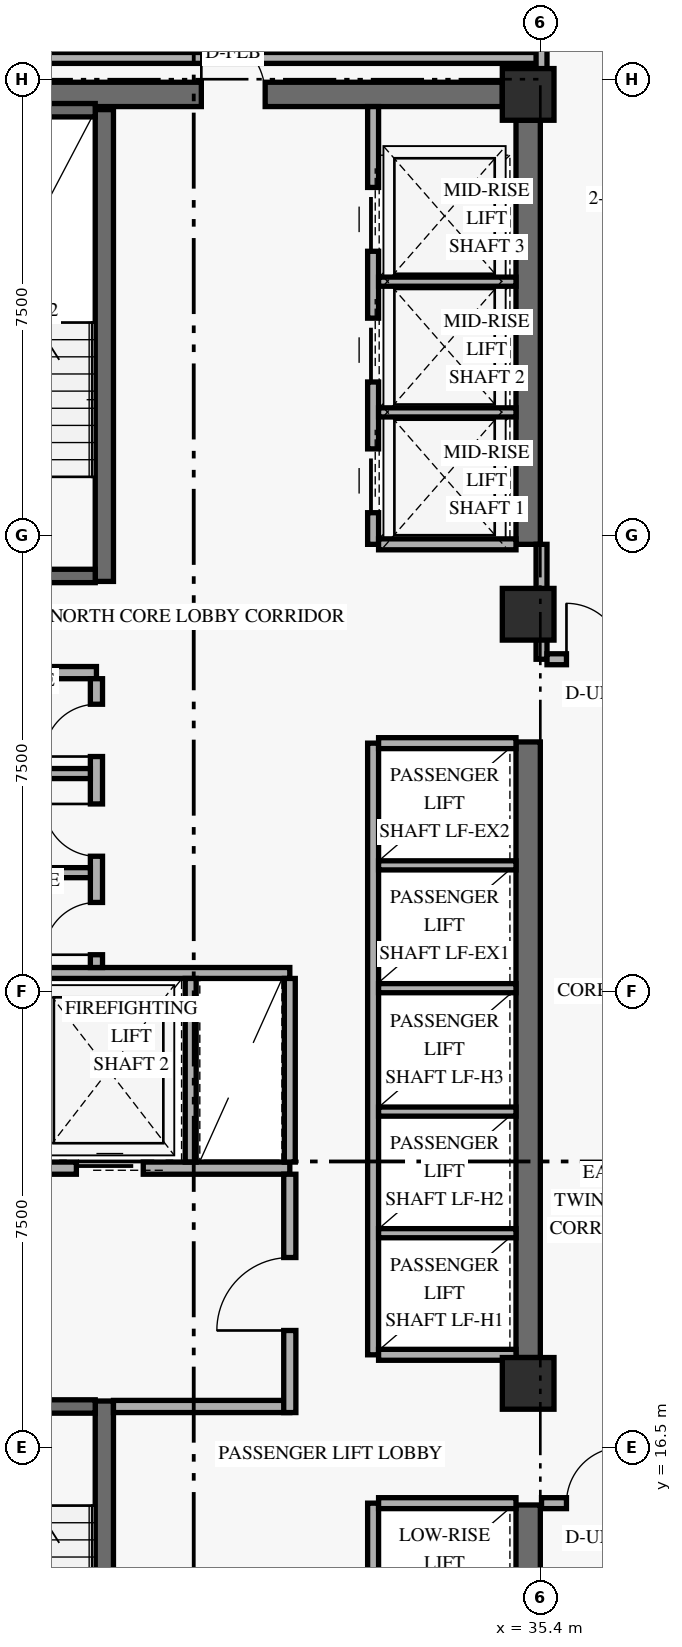
"""IFC4 building model, lengths in metres.
Left out: names, types, materials, properties, quantities, classifications, styles, units other than length and angle.
Written with IfcOpenShell. Run it as: python <this file> out.ifc"""

import sys

from ifc_helpers import new_model, si_unit, direction, frame, frame_2d, origin, origin_2d, place, context, subcontext, project, spatial, rectangle, extrude, element, fill, save


model = new_model("IFC4")
c1 = context("Model", 3, precision=1e-05, world=origin(), true_north=direction((0.0, 1.0)))
c2 = subcontext(c1, "Body", "Model", "MODEL_VIEW")
j1 = project(units=[si_unit("LENGTHUNIT", "METRE"), si_unit("PLANEANGLEUNIT", "RADIAN")], contexts=[c1])
p1 = place(None, origin())
s1 = spatial("IfcSite", under=j1, at=p1, CompositionType="ELEMENT")
p2 = place(p1, origin())
s2 = spatial("IfcBuilding", under=s1, at=p2, CompositionType="ELEMENT")
p3 = place(p2, frame((0.0, 0.0, 102.6)))
s3 = spatial("IfcBuildingStorey", under=s2, at=p3, CompositionType="ELEMENT", Elevation=102.6)
p4 = place(p3, frame((35.2, 9.675, 0.0), z_axis=(0.0, 0.0, 1.0), x_axis=(0.0, 1.0, 0.0)))
e1 = element("IfcWall", 1, at=p4, inside=s3, PredefinedType="SHEAR", context=c2, shape_type="SweptSolid", body=[
    extrude(rectangle(XDim=5.875, YDim=0.4, at=frame_2d((2.938, 0.0))), origin(), (0.0, 0.0, 1.0), 2.749),
])
p5 = place(p3, frame((35.2, 17.975, 0.0), z_axis=(0.0, 0.0, 1.0), x_axis=(0.0, 1.0, 0.0)))
e2 = element("IfcWall", 2, at=p5, inside=s3, PredefinedType="SHEAR", context=c2, shape_type="SweptSolid", body=[
    extrude(rectangle(XDim=10.125, YDim=0.4, at=frame_2d((5.062, 0.0))), origin(), (0.0, 0.0, 1.0), 2.749),
])
p6 = place(p3, frame((35.2, 31.35, 0.0), z_axis=(0.0, 0.0, 1.0), x_axis=(0.0, 1.0, 0.0)))
e3 = element("IfcWall", 3, at=p6, inside=s3, PredefinedType="SHEAR", context=c2, shape_type="SweptSolid", body=[
    extrude(rectangle(XDim=6.975, YDim=0.4, at=frame_2d((3.487, 0.0))), origin(), (0.0, 0.0, 1.0), 2.749),
])
p7 = place(p3, frame((24.625, 38.75, 0.0), z_axis=(0.0, 0.0, 1.0), x_axis=(1.0, 0.0, 0.0)))
e4 = element("IfcWall", 4, at=p7, inside=s3, PredefinedType="SHEAR", context=c2, shape_type="SweptSolid", body=[
    extrude(rectangle(XDim=10.15, YDim=0.4, at=frame_2d((5.075, 0.0))), origin(), (0.0, 0.0, 1.0), 3.36),
])
p8 = place(p7, frame((5.2, 0.0, 0.0)))
e5 = element("IfcOpeningElement", 5, at=p8, cuts=e4, PredefinedType="OPENING", context=c2, shape_type="SweptSolid", body=[
    extrude(rectangle(XDim=1.05, YDim=2.15, at=frame_2d((0.525, 1.075))), frame((0.0, 0.21, 0.0), z_axis=(0.0, -1.0, 0.0), x_axis=(1.0, 0.0, 0.0)), (0.0, 0.0, 1.0), 0.42),
])
p9 = place(p3, frame((28.23, 9.5, 0.0), z_axis=(0.0, 0.0, 1.0), x_axis=(0.0, 1.0, 0.0)))
e6 = element("IfcWall", 6, at=p9, inside=s3, PredefinedType="SHEAR", context=c2, shape_type="SweptSolid", body=[
    extrude(rectangle(XDim=7.76, YDim=0.3, at=frame_2d((3.88, 0.0))), origin(), (0.0, 0.0, 1.0), 3.36),
])
p10 = place(p3, frame((24.92, 17.17, 0.0), z_axis=(0.0, 0.0, 1.0), x_axis=(1.0, 0.0, 0.0)))
e7 = element("IfcWall", 7, at=p10, inside=s3, PredefinedType="SHEAR", context=c2, shape_type="SweptSolid", body=[
    extrude(rectangle(XDim=3.16, YDim=0.22, at=frame_2d((1.58, 0.0))), origin(), (0.0, 0.0, 1.0), 3.36),
])
p11 = place(p10, frame((0.78, 0.0, 0.0)))
e8 = element("IfcOpeningElement", 8, at=p11, cuts=e7, PredefinedType="OPENING", context=c2, shape_type="SweptSolid", body=[
    extrude(rectangle(XDim=1.05, YDim=2.15, at=frame_2d((0.525, 1.075))), frame((0.0, 0.12, 0.0), z_axis=(0.0, -1.0, 0.0), x_axis=(1.0, 0.0, 0.0)), (0.0, 0.0, 1.0), 0.24),
])
p12 = place(p3, frame((28.23, 30.74, 0.0), z_axis=(0.0, 0.0, 1.0), x_axis=(0.0, 1.0, 0.0)))
e9 = element("IfcWall", 9, at=p12, inside=s3, PredefinedType="SHEAR", context=c2, shape_type="SweptSolid", body=[
    extrude(rectangle(XDim=7.76, YDim=0.3, at=frame_2d((3.88, 0.0))), origin(), (0.0, 0.0, 1.0), 3.36),
])
p13 = place(p3, frame((24.92, 30.83, 0.0), z_axis=(0.0, 0.0, 1.0), x_axis=(1.0, 0.0, 0.0)))
e10 = element("IfcWall", 10, at=p13, inside=s3, PredefinedType="SHEAR", context=c2, shape_type="SweptSolid", body=[
    extrude(rectangle(XDim=3.16, YDim=0.22, at=frame_2d((1.58, 0.0))), origin(), (0.0, 0.0, 1.0), 3.36),
])
p14 = place(p13, frame((0.78, 0.0, 0.0)))
e11 = element("IfcOpeningElement", 11, at=p14, cuts=e10, PredefinedType="OPENING", context=c2, shape_type="SweptSolid", body=[
    extrude(rectangle(XDim=1.05, YDim=2.15, at=frame_2d((0.525, 1.075))), frame((0.0, 0.12, 0.0), z_axis=(0.0, -1.0, 0.0), x_axis=(1.0, 0.0, 0.0)), (0.0, 0.0, 1.0), 0.24),
])
p15 = place(p3, frame((24.92, 38.49, 0.0), z_axis=(0.0, 0.0, 1.0), x_axis=(1.0, 0.0, 0.0)))
e12 = element("IfcWall", 12, at=p15, inside=s3, PredefinedType="SHEAR", context=c2, shape_type="SweptSolid", body=[
    extrude(rectangle(XDim=3.16, YDim=0.22, at=frame_2d((1.58, 0.0))), origin(), (0.0, 0.0, 1.0), 3.36),
])
for number, where, z_axis, x_axis in (
    (13, (35.2, 17.55, 0.0), (0.0, 0.0, 1.0), (1.0, 0.0, 0.0)),
    (14, (35.2, 30.2, 0.0), (0.0, 0.0, 1.0), (1.0, 0.0, 0.0)),
    (15, (35.2, 38.75, 0.0), (0.0, 0.0, 1.0), (1.0, 0.0, 0.0)),
):
    element("IfcColumn", number, at=place(p3, frame(where, z_axis=z_axis, x_axis=x_axis)), inside=s3, PredefinedType="COLUMN", context=c2, shape_type="SweptSolid", body=[
        extrude(rectangle(XDim=0.85, YDim=0.85, at=origin_2d()), origin(), (0.0, 0.0, 1.0), 3.6),
    ])
p16 = place(p3, frame((24.45, 21.09, 0.0), z_axis=(0.0, 0.0, 1.0), x_axis=(1.0, 0.0, 0.0)))
e16 = element("IfcWall", 16, at=p16, inside=s3, PredefinedType="STANDARD", context=c2, shape_type="SweptSolid", body=[
    extrude(rectangle(XDim=6.83, YDim=0.2, at=frame_2d((3.415, 0.0))), origin(), (0.0, 0.0, 1.0), 3.36),
])
p17 = place(p16, frame((0.72, 0.0, 0.0)))
e17 = element("IfcOpeningElement", 17, at=p17, cuts=e16, PredefinedType="OPENING", context=c2, shape_type="SweptSolid", body=[
    extrude(rectangle(XDim=1.1, YDim=2.2, at=frame_2d((0.55, 1.1))), frame((0.0, 0.11, 0.0), z_axis=(0.0, -1.0, 0.0), x_axis=(1.0, 0.0, 0.0)), (0.0, 0.0, 1.0), 0.22),
])
p18 = place(p16, frame((3.32, 0.0, 0.0)))
e18 = element("IfcOpeningElement", 18, at=p18, cuts=e16, PredefinedType="OPENING", context=c2, shape_type="SweptSolid", body=[
    extrude(rectangle(XDim=1.1, YDim=2.2, at=frame_2d((0.55, 1.1))), frame((0.0, 0.11, 0.0), z_axis=(0.0, -1.0, 0.0), x_axis=(1.0, 0.0, 0.0)), (0.0, 0.0, 1.0), 0.22),
])
p19 = place(p3, frame((28.38, 17.17, 0.0), z_axis=(0.0, 0.0, 1.0), x_axis=(1.0, 0.0, 0.0)))
e19 = element("IfcWall", 19, at=p19, inside=s3, PredefinedType="STANDARD", context=c2, shape_type="SweptSolid", body=[
    extrude(rectangle(XDim=2.9, YDim=0.2, at=frame_2d((1.45, 0.0))), origin(), (0.0, 0.0, 1.0), 3.36),
])
p20 = place(p3, frame((31.28, 17.07, 0.0), z_axis=(0.0, 0.0, 1.0), x_axis=(0.0, 1.0, 0.0)))
e20 = element("IfcWall", 20, at=p20, inside=s3, PredefinedType="STANDARD", context=c2, shape_type="SweptSolid", body=[
    extrude(rectangle(XDim=3.92, YDim=0.2, at=frame_2d((1.96, 0.0))), origin(), (0.0, 0.0, 1.0), 2.731),
])
p21 = place(p20, frame((1.35, 0.0, 0.0)))
e21 = element("IfcOpeningElement", 21, at=p21, cuts=e20, PredefinedType="OPENING", context=c2, shape_type="SweptSolid", body=[
    extrude(rectangle(XDim=1.2, YDim=2.15, at=frame_2d((0.6, 1.075))), frame((0.0, 0.11, 0.0), z_axis=(0.0, -1.0, 0.0), x_axis=(1.0, 0.0, 0.0)), (0.0, 0.0, 1.0), 0.22),
])
p22 = place(p3, frame((24.45, 24.3, 0.0), z_axis=(0.0, 0.0, 1.0), x_axis=(1.0, 0.0, 0.0)))
e22 = element("IfcWall", 22, at=p22, inside=s3, PredefinedType="STANDARD", context=c2, shape_type="SweptSolid", body=[
    extrude(rectangle(XDim=6.83, YDim=0.18, at=frame_2d((3.415, 0.0))), origin(), (0.0, 0.0, 1.0), 3.36),
])
for number, where, z_axis, x_axis in (
    (23, (29.65, 21.19, 0.0), (0.0, 0.0, 1.0), (0.0, 1.0, 0.0)),
    (24, (31.28, 21.19, 0.0), (0.0, 0.0, 1.0), (0.0, 1.0, 0.0)),
):
    element("IfcWall", number, at=place(p3, frame(where, z_axis=z_axis, x_axis=x_axis)), inside=s3, PredefinedType="STANDARD", context=c2, shape_type="SweptSolid", body=[
        extrude(rectangle(XDim=3.02, YDim=0.18, at=frame_2d((1.51, 0.0))), origin(), (0.0, 0.0, 1.0), 3.36),
    ])
p23 = place(p3, frame((24.45, 29.24, 0.0), z_axis=(0.0, 0.0, 1.0), x_axis=(1.0, 0.0, 0.0)))
e25 = element("IfcWall", 25, at=p23, inside=s3, PredefinedType="STANDARD", context=c2, shape_type="SweptSolid", body=[
    extrude(rectangle(XDim=3.65, YDim=0.2, at=frame_2d((1.825, 0.0))), origin(), (0.0, 0.0, 1.0), 3.36),
])
p24 = place(p3, frame((28.1, 24.39, 0.0), z_axis=(0.0, 0.0, 1.0), x_axis=(0.0, 1.0, 0.0)))
e26 = element("IfcWall", 26, at=p24, inside=s3, PredefinedType="STANDARD", context=c2, shape_type="SweptSolid", body=[
    extrude(rectangle(XDim=4.75, YDim=0.2, at=frame_2d((2.375, 0.0))), origin(), (0.0, 0.0, 1.0), 3.36),
])
p25 = place(p24, frame((0.21, 0.0, 0.0)))
e27 = element("IfcOpeningElement", 27, at=p25, cuts=e26, PredefinedType="OPENING", context=c2, shape_type="SweptSolid", body=[
    extrude(rectangle(XDim=0.86, YDim=2.1, at=frame_2d((0.43, 1.05))), frame((0.0, 0.11, 0.0), z_axis=(0.0, -1.0, 0.0), x_axis=(1.0, 0.0, 0.0)), (0.0, 0.0, 1.0), 0.22),
])
p26 = place(p24, frame((1.83, 0.0, 0.0)))
e28 = element("IfcOpeningElement", 28, at=p26, cuts=e26, PredefinedType="OPENING", context=c2, shape_type="SweptSolid", body=[
    extrude(rectangle(XDim=0.86, YDim=2.1, at=frame_2d((0.43, 1.05))), frame((0.0, 0.11, 0.0), z_axis=(0.0, -1.0, 0.0), x_axis=(1.0, 0.0, 0.0)), (0.0, 0.0, 1.0), 0.22),
])
p27 = place(p24, frame((3.47, 0.0, 0.0)))
e29 = element("IfcOpeningElement", 29, at=p27, cuts=e26, PredefinedType="OPENING", context=c2, shape_type="SweptSolid", body=[
    extrude(rectangle(XDim=0.86, YDim=2.1, at=frame_2d((0.43, 1.05))), frame((0.0, 0.11, 0.0), z_axis=(0.0, -1.0, 0.0), x_axis=(1.0, 0.0, 0.0)), (0.0, 0.0, 1.0), 0.22),
])
for number, where, z_axis, x_axis in (
    (30, (24.45, 25.95, 0.0), (0.0, 0.0, 1.0), (1.0, 0.0, 0.0)),
    (31, (24.45, 27.58, 0.0), (0.0, 0.0, 1.0), (1.0, 0.0, 0.0)),
):
    element("IfcWall", number, at=place(p3, frame(where, z_axis=z_axis, x_axis=x_axis)), inside=s3, PredefinedType="PARTITIONING", context=c2, shape_type="SweptSolid", body=[
        extrude(rectangle(XDim=3.55, YDim=0.165, at=frame_2d((1.775, 0.0))), origin(), (0.0, 0.0, 1.0), 3.36),
    ])
p28 = place(p3, frame((32.65, 9.5, 0.0), z_axis=(0.0, 0.0, 1.0), x_axis=(0.0, 1.0, 0.0)))
e32 = element("IfcWall", 32, at=p28, inside=s3, PredefinedType="STANDARD", context=c2, shape_type="SweptSolid", body=[
    extrude(rectangle(XDim=6.08, YDim=0.18, at=frame_2d((3.04, 0.0))), origin(), (0.0, 0.0, 1.0), 3.36),
])
p29 = place(p3, frame((32.74, 15.58, 0.0), z_axis=(0.0, 0.0, 1.0), x_axis=(1.0, 0.0, 0.0)))
e33 = element("IfcWall", 33, at=p29, inside=s3, PredefinedType="STANDARD", context=c2, shape_type="SweptSolid", body=[
    extrude(rectangle(XDim=2.26, YDim=0.18, at=frame_2d((1.13, 0.0))), origin(), (0.0, 0.0, 1.0), 3.36),
])
p30 = place(p3, frame((32.65, 18.02, 0.0), z_axis=(0.0, 0.0, 1.0), x_axis=(0.0, 1.0, 0.0)))
e34 = element("IfcWall", 34, at=p30, inside=s3, PredefinedType="STANDARD", context=c2, shape_type="SweptSolid", body=[
    extrude(rectangle(XDim=10.06, YDim=0.18, at=frame_2d((5.03, 0.0))), origin(), (0.0, 0.0, 1.0), 3.36),
])
for number, where, z_axis, x_axis in (
    (35, (32.74, 18.02, 0.0), (0.0, 0.0, 1.0), (1.0, 0.0, 0.0)),
    (36, (32.74, 28.08, 0.0), (0.0, 0.0, 1.0), (1.0, 0.0, 0.0)),
):
    element("IfcWall", number, at=place(p3, frame(where, z_axis=z_axis, x_axis=x_axis)), inside=s3, PredefinedType="STANDARD", context=c2, shape_type="SweptSolid", body=[
        extrude(rectangle(XDim=2.26, YDim=0.18, at=frame_2d((1.13, 0.0))), origin(), (0.0, 0.0, 1.0), 3.36),
    ])
for number, where, z_axis, x_axis in (
    (37, (32.74, 20.02, 0.0), (0.0, 0.0, 1.0), (1.0, 0.0, 0.0)),
    (38, (32.74, 22.02, 0.0), (0.0, 0.0, 1.0), (1.0, 0.0, 0.0)),
    (39, (32.74, 24.05, 0.0), (0.0, 0.0, 1.0), (1.0, 0.0, 0.0)),
    (40, (32.74, 26.07, 0.0), (0.0, 0.0, 1.0), (1.0, 0.0, 0.0)),
):
    element("IfcWall", number, at=place(p3, frame(where, z_axis=z_axis, x_axis=x_axis)), inside=s3, PredefinedType="STANDARD", context=c2, shape_type="SweptSolid", body=[
        extrude(rectangle(XDim=2.26, YDim=0.15, at=frame_2d((1.13, 0.0))), origin(), (0.0, 0.0, 1.0), 3.36),
    ])
p31 = place(p3, frame((32.65, 31.35, 0.0), z_axis=(0.0, 0.0, 1.0), x_axis=(0.0, 1.0, 0.0)))
e41 = element("IfcWall", 41, at=p31, inside=s3, PredefinedType="STANDARD", context=c2, shape_type="SweptSolid", body=[
    extrude(rectangle(XDim=7.2, YDim=0.18, at=frame_2d((3.6, 0.0))), origin(), (0.0, 0.0, 1.0), 3.36),
])
p32 = place(p31, frame((0.52, 0.0, 0.0)))
e42 = element("IfcOpeningElement", 42, at=p32, cuts=e41, PredefinedType="OPENING", context=c2, shape_type="SweptSolid", body=[
    extrude(rectangle(XDim=1.05, YDim=2.2, at=frame_2d((0.525, 1.1))), frame((0.0, 0.1, 0.0), z_axis=(0.0, -1.0, 0.0), x_axis=(1.0, 0.0, 0.0)), (0.0, 0.0, 1.0), 0.2),
])
p33 = place(p31, frame((2.67, 0.0, 0.0)))
e43 = element("IfcOpeningElement", 43, at=p33, cuts=e41, PredefinedType="OPENING", context=c2, shape_type="SweptSolid", body=[
    extrude(rectangle(XDim=1.05, YDim=2.2, at=frame_2d((0.525, 1.1))), frame((0.0, 0.1, 0.0), z_axis=(0.0, -1.0, 0.0), x_axis=(1.0, 0.0, 0.0)), (0.0, 0.0, 1.0), 0.2),
])
p34 = place(p31, frame((4.82, 0.0, 0.0)))
e44 = element("IfcOpeningElement", 44, at=p34, cuts=e41, PredefinedType="OPENING", context=c2, shape_type="SweptSolid", body=[
    extrude(rectangle(XDim=1.05, YDim=2.2, at=frame_2d((0.525, 1.1))), frame((0.0, 0.1, 0.0), z_axis=(0.0, -1.0, 0.0), x_axis=(1.0, 0.0, 0.0)), (0.0, 0.0, 1.0), 0.2),
])
p35 = place(p3, frame((32.74, 31.35, 0.0), z_axis=(0.0, 0.0, 1.0), x_axis=(1.0, 0.0, 0.0)))
e45 = element("IfcWall", 45, at=p35, inside=s3, PredefinedType="STANDARD", context=c2, shape_type="SweptSolid", body=[
    extrude(rectangle(XDim=2.26, YDim=0.18, at=frame_2d((1.13, 0.0))), origin(), (0.0, 0.0, 1.0), 3.36),
])
for number, where, z_axis, x_axis in (
    (46, (32.74, 33.52, 0.0), (0.0, 0.0, 1.0), (1.0, 0.0, 0.0)),
    (47, (32.74, 35.67, 0.0), (0.0, 0.0, 1.0), (1.0, 0.0, 0.0)),
):
    element("IfcWall", number, at=place(p3, frame(where, z_axis=z_axis, x_axis=x_axis)), inside=s3, PredefinedType="STANDARD", context=c2, shape_type="SweptSolid", body=[
        extrude(rectangle(XDim=2.26, YDim=0.15, at=frame_2d((1.13, 0.0))), origin(), (0.0, 0.0, 1.0), 3.36),
    ])
p36 = place(p3, frame((35.42, 15.58, 0.0), z_axis=(0.0, 0.0, 1.0), x_axis=(1.0, 0.0, 0.0)))
e48 = element("IfcWall", 48, at=p36, inside=s3, PredefinedType="STANDARD", context=c2, shape_type="SweptSolid", body=[
    extrude(rectangle(XDim=11.18, YDim=0.18, at=frame_2d((5.59, 0.0))), origin(), (0.0, 0.0, 1.0), 2.731),
])
p37 = place(p36, frame((0.41, 0.0, 0.0)))
e49 = element("IfcOpeningElement", 49, at=p37, cuts=e48, PredefinedType="OPENING", context=c2, shape_type="SweptSolid", body=[
    extrude(rectangle(XDim=0.92, YDim=2.15, at=frame_2d((0.46, 1.075))), frame((0.0, 0.1, 0.0), z_axis=(0.0, -1.0, 0.0), x_axis=(1.0, 0.0, 0.0)), (0.0, 0.0, 1.0), 0.2),
])
p38 = place(p3, frame((35.42, 29.46, 0.0), z_axis=(0.0, 0.0, 1.0), x_axis=(0.0, 1.0, 0.0)))
e50 = element("IfcWall", 50, at=p38, inside=s3, PredefinedType="STANDARD", context=c2, shape_type="SweptSolid", body=[
    extrude(rectangle(XDim=1.89, YDim=0.18, at=frame_2d((0.945, 0.0))), origin(), (0.0, 0.0, 1.0), 2.731),
])
p39 = place(p3, frame((35.51, 29.46, 0.0), z_axis=(0.0, 0.0, 1.0), x_axis=(1.0, 0.0, 0.0)))
e51 = element("IfcWall", 51, at=p39, inside=s3, PredefinedType="STANDARD", context=c2, shape_type="SweptSolid", body=[
    extrude(rectangle(XDim=11.09, YDim=0.18, at=frame_2d((5.545, 0.0))), origin(), (0.0, 0.0, 1.0), 2.731),
])
p40 = place(p39, frame((0.32, 0.0, 0.0)))
e52 = element("IfcOpeningElement", 52, at=p40, cuts=e51, PredefinedType="OPENING", context=c2, shape_type="SweptSolid", body=[
    extrude(rectangle(XDim=0.92, YDim=2.15, at=frame_2d((0.46, 1.075))), frame((0.0, 0.1, 0.0), z_axis=(0.0, -1.0, 0.0), x_axis=(1.0, 0.0, 0.0)), (0.0, 0.0, 1.0), 0.2),
])
p41 = place(p3, frame((23.85, 39.35, 0.0), z_axis=(0.0, 0.0, 1.0), x_axis=(1.0, 0.0, 0.0)))
e53 = element("IfcWall", 53, at=p41, inside=s3, PredefinedType="STANDARD", context=c2, shape_type="SweptSolid", body=[
    extrude(rectangle(XDim=11.57, YDim=0.18, at=frame_2d((5.785, 0.0))), origin(), (0.0, 0.0, 1.0), 2.731),
])
p42 = place(p3, frame((35.42, 38.75, 0.0), z_axis=(0.0, 0.0, 1.0), x_axis=(0.0, 1.0, 0.0)))
e54 = element("IfcWall", 54, at=p42, inside=s3, PredefinedType="PARTITIONING", context=c2, shape_type="SweptSolid", body=[
    extrude(rectangle(XDim=6.27, YDim=0.18, at=frame_2d((3.135, 0.0))), origin(), (0.0, 0.0, 1.0), 2.731),
])
p43 = place(p18, origin())
e55 = element("IfcDoor", 55, at=p43, inside=s3, OperationType="SLIDING_TO_LEFT", PredefinedType="DOOR", context=c2, shape_type="SweptSolid", body=[
    extrude(rectangle(XDim=1.1, YDim=2.2, at=frame_2d((0.55, 1.1))), frame((0.0, 0.025, 0.0), z_axis=(0.0, -1.0, 0.0), x_axis=(1.0, 0.0, 0.0)), (0.0, 0.0, 1.0), 0.05),
])
fill(e18, e55)
p44 = place(p21, origin())
e56 = element("IfcDoor", 56, at=p44, inside=s3, OperationType="SINGLE_SWING_LEFT", PredefinedType="DOOR", context=c2, shape_type="SweptSolid", body=[
    extrude(rectangle(XDim=1.2, YDim=2.15, at=frame_2d((0.6, 1.075))), frame((0.0, 0.025, 0.0), z_axis=(0.0, -1.0, 0.0), x_axis=(1.0, 0.0, 0.0)), (0.0, 0.0, 1.0), 0.05),
])
fill(e21, e56)
p45 = place(p25, origin())
e57 = element("IfcDoor", 57, at=p45, inside=s3, OperationType="SINGLE_SWING_LEFT", PredefinedType="DOOR", context=c2, shape_type="SweptSolid", body=[
    extrude(rectangle(XDim=0.86, YDim=2.1, at=frame_2d((0.43, 1.05))), frame((0.0, 0.025, 0.0), z_axis=(0.0, -1.0, 0.0), x_axis=(1.0, 0.0, 0.0)), (0.0, 0.0, 1.0), 0.05),
])
fill(e27, e57)
p46 = place(p26, origin())
e58 = element("IfcDoor", 58, at=p46, inside=s3, OperationType="SINGLE_SWING_RIGHT", PredefinedType="DOOR", context=c2, shape_type="SweptSolid", body=[
    extrude(rectangle(XDim=0.86, YDim=2.1, at=frame_2d((0.43, 1.05))), frame((0.0, 0.025, 0.0), z_axis=(0.0, -1.0, 0.0), x_axis=(1.0, 0.0, 0.0)), (0.0, 0.0, 1.0), 0.05),
])
fill(e28, e58)
p47 = place(p27, origin())
e59 = element("IfcDoor", 59, at=p47, inside=s3, OperationType="SINGLE_SWING_LEFT", PredefinedType="DOOR", context=c2, shape_type="SweptSolid", body=[
    extrude(rectangle(XDim=0.86, YDim=2.1, at=frame_2d((0.43, 1.05))), frame((0.0, 0.025, 0.0), z_axis=(0.0, -1.0, 0.0), x_axis=(1.0, 0.0, 0.0)), (0.0, 0.0, 1.0), 0.05),
])
fill(e29, e59)
p48 = place(p32, origin())
e60 = element("IfcDoor", 60, at=p48, inside=s3, OperationType="SLIDING_TO_LEFT", PredefinedType="DOOR", context=c2, shape_type="SweptSolid", body=[
    extrude(rectangle(XDim=1.05, YDim=2.2, at=frame_2d((0.525, 1.1))), frame((0.0, 0.025, 0.0), z_axis=(0.0, -1.0, 0.0), x_axis=(1.0, 0.0, 0.0)), (0.0, 0.0, 1.0), 0.05),
])
fill(e42, e60)
p49 = place(p33, origin())
e61 = element("IfcDoor", 61, at=p49, inside=s3, OperationType="SLIDING_TO_LEFT", PredefinedType="DOOR", context=c2, shape_type="SweptSolid", body=[
    extrude(rectangle(XDim=1.05, YDim=2.2, at=frame_2d((0.525, 1.1))), frame((0.0, 0.025, 0.0), z_axis=(0.0, -1.0, 0.0), x_axis=(1.0, 0.0, 0.0)), (0.0, 0.0, 1.0), 0.05),
])
fill(e43, e61)
p50 = place(p34, origin())
e62 = element("IfcDoor", 62, at=p50, inside=s3, OperationType="SLIDING_TO_LEFT", PredefinedType="DOOR", context=c2, shape_type="SweptSolid", body=[
    extrude(rectangle(XDim=1.05, YDim=2.2, at=frame_2d((0.525, 1.1))), frame((0.0, 0.025, 0.0), z_axis=(0.0, -1.0, 0.0), x_axis=(1.0, 0.0, 0.0)), (0.0, 0.0, 1.0), 0.05),
])
fill(e44, e62)
p51 = place(p8, frame((1.05, 0.0, 0.0), z_axis=(0.0, 0.0, 1.0), x_axis=(-1.0, 0.0, 0.0)))
e63 = element("IfcDoor", 63, at=p51, inside=s3, OperationType="SINGLE_SWING_RIGHT", PredefinedType="DOOR", context=c2, shape_type="SweptSolid", body=[
    extrude(rectangle(XDim=1.05, YDim=2.15, at=frame_2d((0.525, 1.075))), frame((0.0, 0.025, 0.0), z_axis=(0.0, -1.0, 0.0), x_axis=(1.0, 0.0, 0.0)), (0.0, 0.0, 1.0), 0.05),
])
fill(e5, e63)
p52 = place(p37, origin())
e64 = element("IfcDoor", 64, at=p52, inside=s3, OperationType="SINGLE_SWING_RIGHT", PredefinedType="DOOR", context=c2, shape_type="SweptSolid", body=[
    extrude(rectangle(XDim=0.92, YDim=2.15, at=frame_2d((0.46, 1.075))), frame((0.0, 0.025, 0.0), z_axis=(0.0, -1.0, 0.0), x_axis=(1.0, 0.0, 0.0)), (0.0, 0.0, 1.0), 0.05),
])
fill(e49, e64)
p53 = place(p40, origin())
e65 = element("IfcDoor", 65, at=p53, inside=s3, OperationType="SINGLE_SWING_LEFT", PredefinedType="DOOR", context=c2, shape_type="SweptSolid", body=[
    extrude(rectangle(XDim=0.92, YDim=2.15, at=frame_2d((0.46, 1.075))), frame((0.0, 0.025, 0.0), z_axis=(0.0, -1.0, 0.0), x_axis=(1.0, 0.0, 0.0)), (0.0, 0.0, 1.0), 0.05),
])
fill(e52, e65)
save(model, sys.argv[1])
